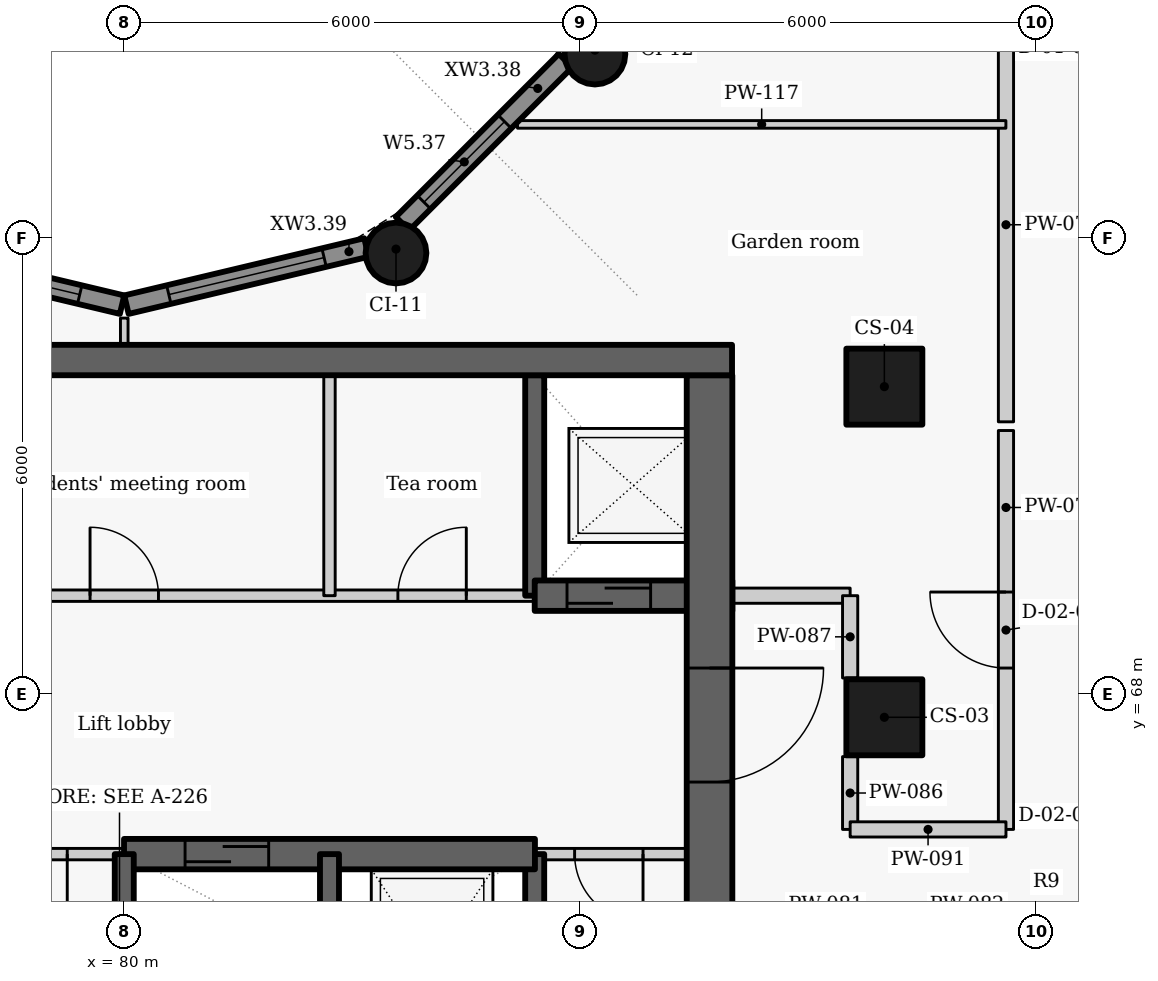
"""IFC4 building model, lengths in metres.
Left out: names, types, materials, properties, quantities, classifications, styles, units other than length and angle.
Written with IfcOpenShell. Run it as: python <this file> out.ifc"""

import sys

from ifc_helpers import new_model, si_unit, direction, frame, frame_2d, origin, origin_2d, place, context, subcontext, project, spatial, rectangle, circle, extrude, element, fill, save


model = new_model("IFC4")
c1 = context("Model", 3, precision=1e-05, world=origin(), true_north=direction((0.0, 1.0)))
c2 = subcontext(c1, "Body", "Model", "MODEL_VIEW")
j1 = project(units=[si_unit("LENGTHUNIT", "METRE"), si_unit("PLANEANGLEUNIT", "RADIAN")], contexts=[c1])
p1 = place(None, origin())
s1 = spatial("IfcSite", under=j1, at=p1, CompositionType="ELEMENT")
p2 = place(p1, origin())
s2 = spatial("IfcBuilding", under=s1, at=p2, CompositionType="ELEMENT")
p3 = place(p2, frame((0.0, 0.0, 140.4)))
s3 = spatial("IfcBuildingStorey", under=s2, at=p3, CompositionType="ELEMENT", Elevation=140.4)
for number, where, z_axis, x_axis in (
    (1, (90.0, 67.7, 0.0), (0.0, 0.0, 1.0), (0.0, 1.0, 0.0)),
    (2, (90.0, 72.05, 0.0), (0.0, 0.0, 1.0), (0.0, 1.0, 0.0)),
):
    element("IfcColumn", number, at=place(p3, frame(where, z_axis=z_axis, x_axis=x_axis)), inside=s3, PredefinedType="COLUMN", context=c2, shape_type="SweptSolid", body=[
        extrude(rectangle(XDim=1.0, YDim=1.0, at=origin_2d()), origin(), (0.0, 0.0, 1.0), 3.3),
    ])
for number, where, z_axis, x_axis in (
    (3, (83.575, 73.808, 0.0), (0.0, 0.0, 1.0), (0.866, 0.5, 0.0)),
    (4, (86.192, 76.425, 0.0), (0.0, 0.0, 1.0), (0.5, 0.866, 0.0)),
):
    element("IfcColumn", number, at=place(p3, frame(where, z_axis=z_axis, x_axis=x_axis)), inside=s3, PredefinedType="COLUMN", context=c2, shape_type="SweptSolid", body=[
        extrude(circle(Radius=0.4, at=origin_2d()), origin(), (0.0, 0.0, 1.0), 3.3),
    ])
p4 = place(p3, frame((85.806, 76.339, 0.0), z_axis=(0.0, 0.0, 1.0), x_axis=(-0.707106781187, -0.707106781187, 0.0)))
e5 = element("IfcWall", 5, at=p4, inside=s3, PredefinedType="SOLIDWALL", context=c2, shape_type="SweptSolid", body=[
    extrude(rectangle(XDim=3.033, YDim=0.25, at=frame_2d((1.517, 0.0))), origin(), (0.0, 0.0, 1.0), 2.425),
])
p5 = place(p4, frame((1.134, 0.0, 0.9)))
e6 = element("IfcOpeningElement", 6, at=p5, cuts=e5, PredefinedType="OPENING", context=c2, shape_type="SweptSolid", body=[
    extrude(rectangle(XDim=1.5, YDim=1.1, at=frame_2d((0.75, 0.55))), frame((0.0, 0.135, 0.0), z_axis=(0.0, -1.0, 0.0), x_axis=(1.0, 0.0, 0.0)), (0.0, 0.0, 1.0), 0.27),
])
p6 = place(p3, frame((83.186, 73.881, 0.0), z_axis=(0.0, 0.0, 1.0), x_axis=(-0.972773113459, -0.231759508395, 0.0)))
e7 = element("IfcWall", 7, at=p6, inside=s3, PredefinedType="SOLIDWALL", context=c2, shape_type="SweptSolid", body=[
    extrude(rectangle(XDim=3.246, YDim=0.25, at=frame_2d((1.623, 0.0))), origin(), (0.0, 0.0, 1.0), 2.425),
])
p7 = place(p6, frame((0.573, 0.0, 0.9)))
e8 = element("IfcOpeningElement", 8, at=p7, cuts=e7, PredefinedType="OPENING", context=c2, shape_type="SweptSolid", body=[
    extrude(rectangle(XDim=2.1, YDim=1.1, at=frame_2d((1.05, 0.55))), frame((0.0, 0.135, 0.0), z_axis=(0.0, -1.0, 0.0), x_axis=(1.0, 0.0, 0.0)), (0.0, 0.0, 1.0), 0.27),
])
p8 = place(p3, frame((79.971, 73.128, 0.0), z_axis=(0.0, 0.0, 1.0), x_axis=(-0.972773113459, 0.231759508395, 0.0)))
e9 = element("IfcWall", 9, at=p8, inside=s3, PredefinedType="SOLIDWALL", context=c2, shape_type="SweptSolid", body=[
    extrude(rectangle(XDim=3.246, YDim=0.25, at=frame_2d((1.623, 0.0))), origin(), (0.0, 0.0, 1.0), 2.425),
])
p9 = place(p8, frame((0.573, 0.0, 0.9)))
e10 = element("IfcOpeningElement", 10, at=p9, cuts=e9, PredefinedType="OPENING", context=c2, shape_type="SweptSolid", body=[
    extrude(rectangle(XDim=2.1, YDim=1.1, at=frame_2d((1.05, 0.55))), frame((0.0, 0.135, 0.0), z_axis=(0.0, -1.0, 0.0), x_axis=(1.0, 0.0, 0.0)), (0.0, 0.0, 1.0), 0.27),
])
p10 = place(p3, frame((72.0, 69.3, 0.0), z_axis=(0.0, 0.0, 1.0), x_axis=(1.0, 0.0, 0.0)))
e11 = element("IfcWall", 11, at=p10, inside=s3, PredefinedType="PARTITIONING", context=c2, shape_type="SweptSolid", body=[
    extrude(rectangle(XDim=13.4, YDim=0.15, at=frame_2d((6.7, 0.0))), origin(), (0.0, 0.0, 1.0), 3.025),
])
p11 = place(p10, frame((1.175, 0.0, 0.0)))
e12 = element("IfcOpeningElement", 12, at=p11, cuts=e11, PredefinedType="OPENING", context=c2, shape_type="SweptSolid", body=[
    extrude(rectangle(XDim=0.9, YDim=2.1, at=frame_2d((0.45, 1.05))), frame((0.0, 0.085, 0.0), z_axis=(0.0, -1.0, 0.0), x_axis=(1.0, 0.0, 0.0)), (0.0, 0.0, 1.0), 0.17),
])
p12 = place(p10, frame((3.5, 0.0, 0.0)))
e13 = element("IfcOpeningElement", 13, at=p12, cuts=e11, PredefinedType="OPENING", context=c2, shape_type="SweptSolid", body=[
    extrude(rectangle(XDim=0.9, YDim=2.1, at=frame_2d((0.45, 1.05))), frame((0.0, 0.085, 0.0), z_axis=(0.0, -1.0, 0.0), x_axis=(1.0, 0.0, 0.0)), (0.0, 0.0, 1.0), 0.17),
])
p13 = place(p10, frame((7.55, 0.0, 0.0)))
e14 = element("IfcOpeningElement", 14, at=p13, cuts=e11, PredefinedType="OPENING", context=c2, shape_type="SweptSolid", body=[
    extrude(rectangle(XDim=0.9, YDim=2.1, at=frame_2d((0.45, 1.05))), frame((0.0, 0.085, 0.0), z_axis=(0.0, -1.0, 0.0), x_axis=(1.0, 0.0, 0.0)), (0.0, 0.0, 1.0), 0.17),
])
p14 = place(p10, frame((11.6, 0.0, 0.0)))
e15 = element("IfcOpeningElement", 15, at=p14, cuts=e11, PredefinedType="OPENING", context=c2, shape_type="SweptSolid", body=[
    extrude(rectangle(XDim=0.9, YDim=2.1, at=frame_2d((0.45, 1.05))), frame((0.0, 0.085, 0.0), z_axis=(0.0, -1.0, 0.0), x_axis=(1.0, 0.0, 0.0)), (0.0, 0.0, 1.0), 0.17),
])
p15 = place(p3, frame((85.4, 63.1, -0.275), z_axis=(0.0, 0.0, 1.0), x_axis=(0.0, 1.0, 0.0)))
e16 = element("IfcWall", 16, at=p15, inside=s3, PredefinedType="SHEAR", context=c2, shape_type="SweptSolid", body=[
    extrude(rectangle(XDim=2.8, YDim=0.25, at=frame_2d((1.4, 0.0))), origin(), (0.0, 0.0, 1.0), 3.3),
])
p16 = place(p3, frame((85.4, 69.3, -0.275), z_axis=(0.0, 0.0, 1.0), x_axis=(0.0, 1.0, 0.0)))
e17 = element("IfcWall", 17, at=p16, inside=s3, PredefinedType="SHEAR", context=c2, shape_type="SweptSolid", body=[
    extrude(rectangle(XDim=2.9, YDim=0.25, at=frame_2d((1.45, 0.0))), origin(), (0.0, 0.0, 1.0), 3.3),
])
p17 = place(p3, frame((85.4, 69.3, -0.275), z_axis=(0.0, 0.0, 1.0), x_axis=(1.0, 0.0, 0.0)))
e18 = element("IfcWall", 18, at=p17, inside=s3, PredefinedType="SHEAR", context=c2, shape_type="SweptSolid", body=[
    extrude(rectangle(XDim=2.6, YDim=0.4, at=frame_2d((1.3, 0.0))), origin(), (0.0, 0.0, 1.0), 3.3),
])
p18 = place(p17, frame((0.425, 0.0, 0.275)))
e19 = element("IfcOpeningElement", 19, at=p18, cuts=e18, PredefinedType="OPENING", context=c2, shape_type="SweptSolid", body=[
    extrude(rectangle(XDim=1.1, YDim=2.1, at=frame_2d((0.55, 1.05))), frame((0.0, 0.21, 0.0), z_axis=(0.0, -1.0, 0.0), x_axis=(1.0, 0.0, 0.0)), (0.0, 0.0, 1.0), 0.42),
])
p19 = place(p3, frame((87.7, 72.2, -0.275), z_axis=(0.0, 0.0, 1.0), x_axis=(0.0, -1.0, 0.0)))
e20 = element("IfcWall", 20, at=p19, inside=s3, PredefinedType="SHEAR", context=c2, shape_type="SweptSolid", body=[
    extrude(rectangle(XDim=15.6, YDim=0.6, at=frame_2d((7.8, 0.0))), origin(), (0.0, 0.0, 1.0), 3.3),
])
p20 = place(p19, frame((3.852, 0.0, 0.275)))
e21 = element("IfcOpeningElement", 21, at=p20, cuts=e20, PredefinedType="OPENING", context=c2, shape_type="SweptSolid", body=[
    extrude(rectangle(XDim=1.5, YDim=2.1, at=frame_2d((0.75, 1.05))), frame((0.0, 0.31, 0.0), z_axis=(0.0, -1.0, 0.0), x_axis=(1.0, 0.0, 0.0)), (0.0, 0.0, 1.0), 0.62),
])
p21 = place(p3, frame((82.7, 69.3, 0.0), z_axis=(0.0, 0.0, 1.0), x_axis=(0.0, 1.0, 0.0)))
e22 = element("IfcWall", 22, at=p21, inside=s3, PredefinedType="PARTITIONING", context=c2, shape_type="SweptSolid", body=[
    extrude(rectangle(XDim=2.9, YDim=0.15, at=frame_2d((1.45, 0.0))), origin(), (0.0, 0.0, 1.0), 3.025),
])
p22 = place(p3, frame((80.003, 65.9, 0.0), z_axis=(0.0, 0.0, 1.0), x_axis=(-1.0, 0.0, 0.0)))
e23 = element("IfcWall", 23, at=p22, inside=s3, PredefinedType="PARTITIONING", context=c2, shape_type="SweptSolid", body=[
    extrude(rectangle(XDim=2.706, YDim=0.15, at=frame_2d((1.353, 0.0))), origin(), (0.0, 0.0, 1.0), 3.025),
])
p23 = place(p22, frame((0.753, 0.0, 0.0)))
e24 = element("IfcOpeningElement", 24, at=p23, cuts=e23, PredefinedType="OPENING", context=c2, shape_type="SweptSolid", body=[
    extrude(rectangle(XDim=1.2, YDim=2.1, at=frame_2d((0.6, 1.05))), frame((0.0, 0.085, 0.0), z_axis=(0.0, -1.0, 0.0), x_axis=(1.0, 0.0, 0.0)), (0.0, 0.0, 1.0), 0.17),
])
p24 = place(p3, frame((88.0, 65.9, 0.0), z_axis=(0.0, 0.0, 1.0), x_axis=(-1.0, 0.0, 0.0)))
e25 = element("IfcWall", 25, at=p24, inside=s3, PredefinedType="PARTITIONING", context=c2, shape_type="SweptSolid", body=[
    extrude(rectangle(XDim=2.603, YDim=0.15, at=frame_2d((1.302, 0.0))), origin(), (0.0, 0.0, 1.0), 3.025),
])
p25 = place(p24, frame((1.175, 0.0, 0.0)))
e26 = element("IfcOpeningElement", 26, at=p25, cuts=e25, PredefinedType="OPENING", context=c2, shape_type="SweptSolid", body=[
    extrude(rectangle(XDim=0.9, YDim=2.1, at=frame_2d((0.45, 1.05))), frame((0.0, 0.085, 0.0), z_axis=(0.0, -1.0, 0.0), x_axis=(1.0, 0.0, 0.0)), (0.0, 0.0, 1.0), 0.17),
])
p26 = place(p3, frame((79.997, 65.9, -0.275), z_axis=(0.0, 0.0, 1.0), x_axis=(1.0, 0.0, 0.0)))
e27 = element("IfcWall", 27, at=p26, inside=s3, PredefinedType="SHEAR", context=c2, shape_type="SweptSolid", body=[
    extrude(rectangle(XDim=5.406, YDim=0.4, at=frame_2d((2.703, 0.0))), origin(), (0.0, 0.0, 1.0), 3.3),
])
p27 = place(p26, frame((0.803, 0.0, 0.275)))
e28 = element("IfcOpeningElement", 28, at=p27, cuts=e27, PredefinedType="OPENING", context=c2, shape_type="SweptSolid", body=[
    extrude(rectangle(XDim=1.1, YDim=2.1, at=frame_2d((0.55, 1.05))), frame((0.0, 0.21, 0.0), z_axis=(0.0, -1.0, 0.0), x_axis=(1.0, 0.0, 0.0)), (0.0, 0.0, 1.0), 0.42),
])
for number, where, z_axis, x_axis in (
    (29, (80.0, 63.1, -0.275), (0.0, 0.0, 1.0), (0.0, 1.0, 0.0)),
    (30, (82.7, 63.1, -0.275), (0.0, 0.0, 1.0), (0.0, 1.0, 0.0)),
):
    element("IfcWall", number, at=place(p3, frame(where, z_axis=z_axis, x_axis=x_axis)), inside=s3, PredefinedType="SHEAR", context=c2, shape_type="SweptSolid", body=[
        extrude(rectangle(XDim=2.8, YDim=0.25, at=frame_2d((1.4, 0.0))), origin(), (0.0, 0.0, 1.0), 3.3),
    ])
p28 = place(p3, frame((91.6, 66.225, 0.0), z_axis=(0.0, 0.0, 1.0), x_axis=(0.0, 1.0, 0.0)))
e31 = element("IfcWall", 31, at=p28, inside=s3, PredefinedType="PARTITIONING", context=c2, shape_type="SweptSolid", body=[
    extrude(rectangle(XDim=5.248, YDim=0.2, at=frame_2d((2.624, 0.0))), origin(), (0.0, 0.0, 1.0), 3.025),
])
p29 = place(p28, frame((2.123, 0.0, 0.0)))
e32 = element("IfcOpeningElement", 32, at=p29, cuts=e31, PredefinedType="OPENING", context=c2, shape_type="SweptSolid", body=[
    extrude(rectangle(XDim=1.0, YDim=2.1, at=frame_2d((0.5, 1.05))), frame((0.0, 0.11, 0.0), z_axis=(0.0, -1.0, 0.0), x_axis=(1.0, 0.0, 0.0)), (0.0, 0.0, 1.0), 0.22),
])
p30 = place(p3, frame((91.6, 71.587, 0.0), z_axis=(0.0, 0.0, 1.0), x_axis=(0.0, 1.0, 0.0)))
e33 = element("IfcWall", 33, at=p30, inside=s3, PredefinedType="PARTITIONING", context=c2, shape_type="SweptSolid", body=[
    extrude(rectangle(XDim=5.186, YDim=0.2, at=frame_2d((2.593, 0.0))), origin(), (0.0, 0.0, 1.0), 3.025),
])
p31 = place(p3, frame((88.0, 69.3, 0.0), z_axis=(0.0, 0.0, 1.0), x_axis=(1.0, 0.0, 0.0)))
e34 = element("IfcWall", 34, at=p31, inside=s3, PredefinedType="PARTITIONING", context=c2, shape_type="SweptSolid", body=[
    extrude(rectangle(XDim=1.55, YDim=0.2, at=frame_2d((0.775, 0.0))), origin(), (0.0, 0.0, 1.0), 3.025),
])
p32 = place(p3, frame((89.55, 66.225, 0.0), z_axis=(0.0, 0.0, 1.0), x_axis=(0.0, 1.0, 0.0)))
e35 = element("IfcWall", 35, at=p32, inside=s3, PredefinedType="PARTITIONING", context=c2, shape_type="SweptSolid", body=[
    extrude(rectangle(XDim=0.958, YDim=0.2, at=frame_2d((0.479, 0.0))), origin(), (0.0, 0.0, 1.0), 3.025),
])
p33 = place(p3, frame((89.55, 68.217, 0.0), z_axis=(0.0, 0.0, 1.0), x_axis=(0.0, 1.0, 0.0)))
e36 = element("IfcWall", 36, at=p33, inside=s3, PredefinedType="PARTITIONING", context=c2, shape_type="SweptSolid", body=[
    extrude(rectangle(XDim=1.083, YDim=0.2, at=frame_2d((0.542, 0.0))), origin(), (0.0, 0.0, 1.0), 3.025),
])
p34 = place(p3, frame((89.55, 66.225, 0.0), z_axis=(0.0, 0.0, 1.0), x_axis=(1.0, 0.0, 0.0)))
e37 = element("IfcWall", 37, at=p34, inside=s3, PredefinedType="PARTITIONING", context=c2, shape_type="SweptSolid", body=[
    extrude(rectangle(XDim=2.05, YDim=0.2, at=frame_2d((1.025, 0.0))), origin(), (0.0, 0.0, 1.0), 2.505),
])
p35 = place(p3, frame((80.0, 72.6, 0.0), z_axis=(0.0, 0.0, 1.0), x_axis=(0.0, 1.0, 0.0)))
e38 = element("IfcWall", 38, at=p35, inside=s3, PredefinedType="PARTITIONING", context=c2, shape_type="SweptSolid", body=[
    extrude(rectangle(XDim=0.352, YDim=0.1, at=frame_2d((0.176, 0.0))), origin(), (0.0, 0.0, 1.0), 3.025),
])
p36 = place(p3, frame((85.173, 75.5, 0.0), z_axis=(0.0, 0.0, 1.0), x_axis=(1.0, 0.0, 0.0)))
e39 = element("IfcWall", 39, at=p36, inside=s3, PredefinedType="PARTITIONING", context=c2, shape_type="SweptSolid", body=[
    extrude(rectangle(XDim=6.426, YDim=0.1, at=frame_2d((3.213, 0.0))), origin(), (0.0, 0.0, 1.0), 2.505),
])
p37 = place(p3, frame((72.004, 72.4, -0.275), z_axis=(0.0, 0.0, 1.0), x_axis=(1.0, 0.0, 0.0)))
e40 = element("IfcWall", 40, at=p37, inside=s3, PredefinedType="SHEAR", context=c2, shape_type="SweptSolid", body=[
    extrude(rectangle(XDim=15.992, YDim=0.4, at=frame_2d((7.996, 0.0))), origin(), (0.0, 0.0, 1.0), 3.3),
])
p38 = place(p5, origin())
e41 = element("IfcWindow", 41, at=p38, inside=s3, PartitioningType="SINGLE_PANEL", PredefinedType="WINDOW", context=c2, shape_type="SweptSolid", body=[
    extrude(rectangle(XDim=1.5, YDim=1.1, at=frame_2d((0.75, 0.55))), frame((0.0, 0.03, 0.0), z_axis=(0.0, -1.0, 0.0), x_axis=(1.0, 0.0, 0.0)), (0.0, 0.0, 1.0), 0.06),
])
fill(e6, e41)
p39 = place(p7, origin())
e42 = element("IfcWindow", 42, at=p39, inside=s3, PartitioningType="SINGLE_PANEL", PredefinedType="WINDOW", context=c2, shape_type="SweptSolid", body=[
    extrude(rectangle(XDim=2.1, YDim=1.1, at=frame_2d((1.05, 0.55))), frame((0.0, 0.03, 0.0), z_axis=(0.0, -1.0, 0.0), x_axis=(1.0, 0.0, 0.0)), (0.0, 0.0, 1.0), 0.06),
])
fill(e8, e42)
p40 = place(p9, origin())
e43 = element("IfcWindow", 43, at=p40, inside=s3, PartitioningType="SINGLE_PANEL", PredefinedType="WINDOW", context=c2, shape_type="SweptSolid", body=[
    extrude(rectangle(XDim=2.1, YDim=1.1, at=frame_2d((1.05, 0.55))), frame((0.0, 0.03, 0.0), z_axis=(0.0, -1.0, 0.0), x_axis=(1.0, 0.0, 0.0)), (0.0, 0.0, 1.0), 0.06),
])
fill(e10, e43)
p41 = place(p18, origin())
e44 = element("IfcDoor", 44, at=p41, inside=s3, OperationType="SLIDING_TO_LEFT", PredefinedType="DOOR", context=c2, shape_type="SweptSolid", body=[
    extrude(rectangle(XDim=1.1, YDim=2.1, at=frame_2d((0.55, 1.05))), frame((0.0, 0.025, 0.0), z_axis=(0.0, -1.0, 0.0), x_axis=(1.0, 0.0, 0.0)), (0.0, 0.0, 1.0), 0.05),
])
fill(e19, e44)
p42 = place(p13, origin())
e45 = element("IfcDoor", 45, at=p42, inside=s3, OperationType="SINGLE_SWING_LEFT", PredefinedType="DOOR", context=c2, shape_type="SweptSolid", body=[
    extrude(rectangle(XDim=0.9, YDim=2.1, at=frame_2d((0.45, 1.05))), frame((0.0, 0.025, 0.0), z_axis=(0.0, -1.0, 0.0), x_axis=(1.0, 0.0, 0.0)), (0.0, 0.0, 1.0), 0.05),
])
fill(e14, e45)
p43 = place(p14, origin())
e46 = element("IfcDoor", 46, at=p43, inside=s3, OperationType="SINGLE_SWING_RIGHT", PredefinedType="DOOR", context=c2, shape_type="SweptSolid", body=[
    extrude(rectangle(XDim=0.9, YDim=2.1, at=frame_2d((0.45, 1.05))), frame((0.0, 0.025, 0.0), z_axis=(0.0, -1.0, 0.0), x_axis=(1.0, 0.0, 0.0)), (0.0, 0.0, 1.0), 0.05),
])
fill(e15, e46)
p44 = place(p23, origin())
e47 = element("IfcDoor", 47, at=p44, inside=s3, OperationType="DOUBLE_DOOR_SINGLE_SWING", PredefinedType="DOOR", context=c2, shape_type="SweptSolid", body=[
    extrude(rectangle(XDim=1.2, YDim=2.1, at=frame_2d((0.6, 1.05))), frame((0.0, 0.025, 0.0), z_axis=(0.0, -1.0, 0.0), x_axis=(1.0, 0.0, 0.0)), (0.0, 0.0, 1.0), 0.05),
])
fill(e24, e47)
p45 = place(p27, origin())
e48 = element("IfcDoor", 48, at=p45, inside=s3, OperationType="SLIDING_TO_LEFT", PredefinedType="DOOR", context=c2, shape_type="SweptSolid", body=[
    extrude(rectangle(XDim=1.1, YDim=2.1, at=frame_2d((0.55, 1.05))), frame((0.0, 0.025, 0.0), z_axis=(0.0, -1.0, 0.0), x_axis=(1.0, 0.0, 0.0)), (0.0, 0.0, 1.0), 0.05),
])
fill(e28, e48)
p46 = place(p25, origin())
e49 = element("IfcDoor", 49, at=p46, inside=s3, OperationType="SINGLE_SWING_LEFT", PredefinedType="DOOR", context=c2, shape_type="SweptSolid", body=[
    extrude(rectangle(XDim=0.9, YDim=2.1, at=frame_2d((0.45, 1.05))), frame((0.0, 0.025, 0.0), z_axis=(0.0, -1.0, 0.0), x_axis=(1.0, 0.0, 0.0)), (0.0, 0.0, 1.0), 0.05),
])
fill(e26, e49)
p47 = place(p29, origin())
e50 = element("IfcDoor", 50, at=p47, inside=s3, OperationType="SINGLE_SWING_RIGHT", PredefinedType="DOOR", context=c2, shape_type="SweptSolid", body=[
    extrude(rectangle(XDim=1.0, YDim=2.1, at=frame_2d((0.5, 1.05))), frame((0.0, 0.025, 0.0), z_axis=(0.0, -1.0, 0.0), x_axis=(1.0, 0.0, 0.0)), (0.0, 0.0, 1.0), 0.05),
])
fill(e32, e50)
p48 = place(p20, origin())
e51 = element("IfcDoor", 51, at=p48, inside=s3, OperationType="DOUBLE_DOOR_SINGLE_SWING", PredefinedType="DOOR", context=c2, shape_type="SweptSolid", body=[
    extrude(rectangle(XDim=1.5, YDim=2.1, at=frame_2d((0.75, 1.05))), frame((0.0, 0.025, 0.0), z_axis=(0.0, -1.0, 0.0), x_axis=(1.0, 0.0, 0.0)), (0.0, 0.0, 1.0), 0.05),
])
fill(e21, e51)
save(model, sys.argv[1])
